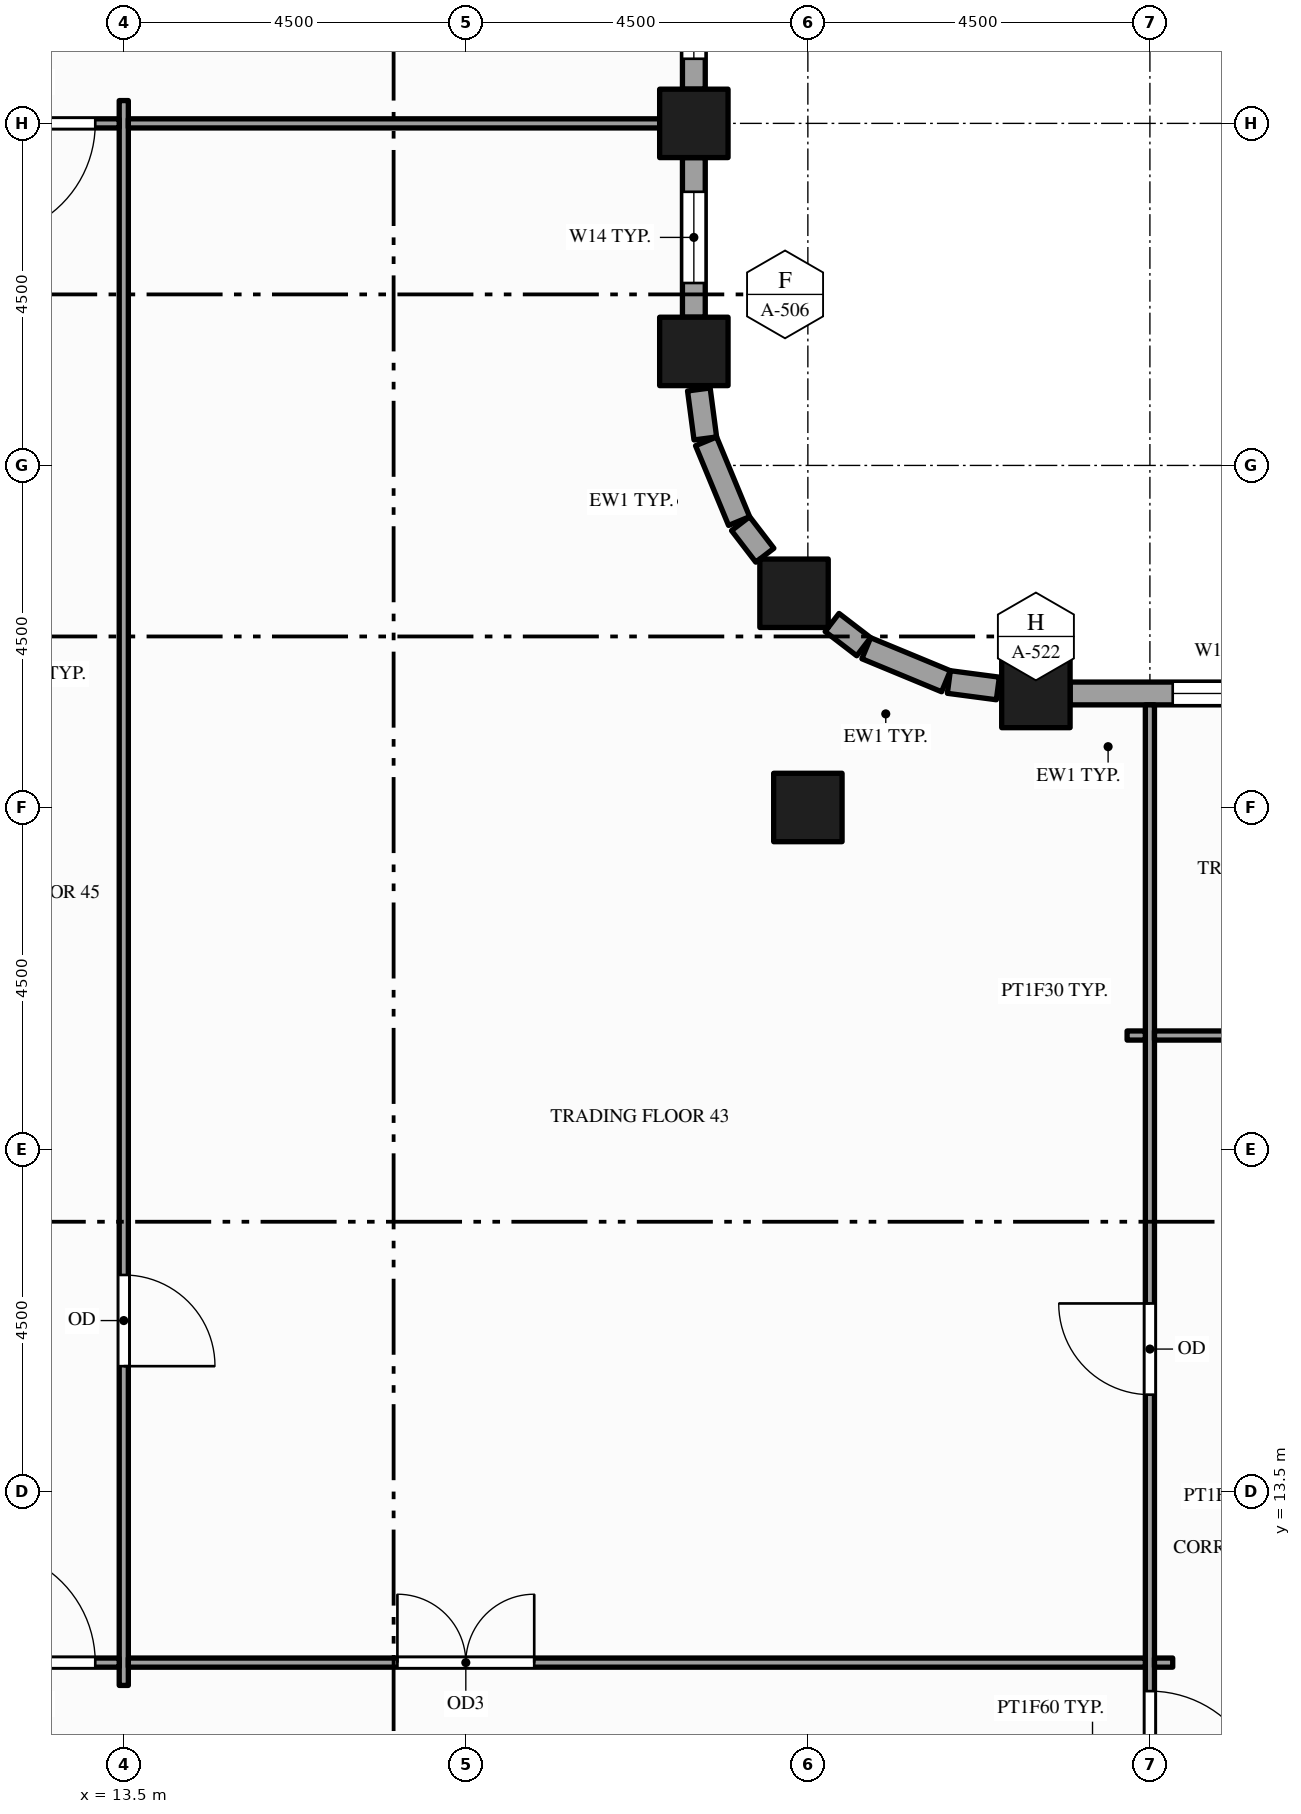
"""IFC4 building model, lengths in metres.
Left out: names, types, materials, properties, quantities, classifications, styles, units other than length and angle.
Written with IfcOpenShell. Run it as: python <this file> out.ifc"""

import sys

from ifc_helpers import new_model, si_unit, direction, frame, frame_2d, origin, origin_2d, place, context, subcontext, project, spatial, rectangle, hollow_rectangle, extrude, element, fill, save


model = new_model("IFC4")
c1 = context("Model", 3, precision=1e-05, world=origin(), true_north=direction((0.0, 1.0)))
c2 = subcontext(c1, "Body", "Model", "MODEL_VIEW")
j1 = project(units=[si_unit("LENGTHUNIT", "METRE"), si_unit("PLANEANGLEUNIT", "RADIAN")], contexts=[c1])
p1 = place(None, origin())
s1 = spatial("IfcSite", under=j1, at=p1, CompositionType="ELEMENT")
p2 = place(p1, origin())
s2 = spatial("IfcBuilding", under=s1, at=p2, CompositionType="ELEMENT")
p3 = place(p2, frame((0.0, 0.0, 179.0)))
s3 = spatial("IfcBuildingStorey", under=s2, at=p3, CompositionType="ELEMENT", Elevation=179.0)
for number, where, z_axis, x_axis in (
    (1, (21.0, 28.5, -0.15), (0.0, 0.0, 1.0), (1.0, 0.0, 0.0)),
    (2, (21.0, 31.5, -0.15), (0.0, 0.0, 1.0), (1.0, 0.0, 0.0)),
    (3, (22.318, 25.318, -0.15), (0.0, 0.0, 1.0), (1.0, 0.0, 0.0)),
    (4, (22.5, 22.5, -0.15), (0.0, 0.0, 1.0), (1.0, 0.0, 0.0)),
    (5, (25.5, 24.0, -0.15), (0.0, 0.0, 1.0), (1.0, 0.0, 0.0)),
):
    element("IfcColumn", number, at=place(p3, frame(where, z_axis=z_axis, x_axis=x_axis)), inside=s3, PredefinedType="COLUMN", context=c2, shape_type="SweptSolid", body=[
        extrude(hollow_rectangle(XDim=0.9, YDim=0.9, WallThickness=0.045, at=origin_2d()), origin(), (0.0, 0.0, 1.0), 4.0),
    ])
p4 = place(p3, frame((31.05, 24.0, 0.0), z_axis=(0.0, 0.0, 1.0), x_axis=(-1.0, 0.0, 0.0)))
e6 = element("IfcWall", 6, at=p4, inside=s3, PredefinedType="STANDARD", context=c2, shape_type="SweptSolid", body=[
    extrude(rectangle(XDim=5.1, YDim=0.3, at=frame_2d((2.55, 0.0))), origin(), (0.0, 0.0, 1.0), 2.87),
])
p5 = place(p4, frame((0.4, 0.0, 0.9)))
e7 = element("IfcOpeningElement", 7, at=p5, cuts=e6, PredefinedType="OPENING", context=c2, shape_type="SweptSolid", body=[
    extrude(rectangle(XDim=1.1, YDim=1.75, at=frame_2d((0.55, 0.875))), frame((0.0, 0.16, 0.0), z_axis=(0.0, -1.0, 0.0), x_axis=(1.0, 0.0, 0.0)), (0.0, 0.0, 1.0), 0.32),
])
p6 = place(p4, frame((2.1, 0.0, 0.9)))
e8 = element("IfcOpeningElement", 8, at=p6, cuts=e6, PredefinedType="OPENING", context=c2, shape_type="SweptSolid", body=[
    extrude(rectangle(XDim=1.65, YDim=1.75, at=frame_2d((0.825, 0.875))), frame((0.0, 0.16, 0.0), z_axis=(0.0, -1.0, 0.0), x_axis=(1.0, 0.0, 0.0)), (0.0, 0.0, 1.0), 0.32),
])
p7 = place(p3, frame((25.0, 24.066, 0.0), z_axis=(0.0, 0.0, 1.0), x_axis=(-0.991423590996, 0.130687655177, 0.0)))
e9 = element("IfcWall", 9, at=p7, inside=s3, PredefinedType="STANDARD", context=c2, shape_type="SweptSolid", body=[
    extrude(rectangle(XDim=0.65, YDim=0.3, at=frame_2d((0.325, 0.0))), origin(), (0.0, 0.0, 1.0), 2.87),
])
p8 = place(p3, frame((24.317, 24.161, 0.0), z_axis=(0.0, 0.0, 1.0), x_axis=(-0.923914616768, 0.382598720491, 0.0)))
e10 = element("IfcWall", 10, at=p8, inside=s3, PredefinedType="STANDARD", context=c2, shape_type="SweptSolid", body=[
    extrude(rectangle(XDim=1.135, YDim=0.3, at=frame_2d((0.568, 0.0))), origin(), (0.0, 0.0, 1.0), 3.149),
])
for number, where, z_axis, x_axis in (
    (11, (23.234, 24.615, 0.0), (0.0, 0.0, 1.0), (-0.794, 0.609, 0.0)),
    (12, (21.934, 25.819, 0.0), (0.0, 0.0, 1.0), (-0.609, 0.794, 0.0)),
):
    element("IfcWall", number, at=place(p3, frame(where, z_axis=z_axis, x_axis=x_axis)), inside=s3, PredefinedType="STANDARD", context=c2, shape_type="SweptSolid", body=[
        extrude(rectangle(XDim=0.524, YDim=0.3, at=frame_2d((0.262, 0.0))), origin(), (0.0, 0.0, 1.0), 3.149),
    ])
p9 = place(p3, frame((21.595, 26.268, 0.0), z_axis=(0.0, 0.0, 1.0), x_axis=(-0.382598720491, 0.923914616768, 0.0)))
e13 = element("IfcWall", 13, at=p9, inside=s3, PredefinedType="STANDARD", context=c2, shape_type="SweptSolid", body=[
    extrude(rectangle(XDim=1.135, YDim=0.3, at=frame_2d((0.568, 0.0))), origin(), (0.0, 0.0, 1.0), 3.149),
])
p10 = place(p3, frame((21.151, 27.355, 0.0), z_axis=(0.0, 0.0, 1.0), x_axis=(-0.130687655177, 0.991423590996, 0.0)))
e14 = element("IfcWall", 14, at=p10, inside=s3, PredefinedType="STANDARD", context=c2, shape_type="SweptSolid", body=[
    extrude(rectangle(XDim=0.65, YDim=0.3, at=frame_2d((0.325, 0.0))), origin(), (0.0, 0.0, 1.0), 3.149),
])
p11 = place(p3, frame((21.0, 28.95, 0.0), z_axis=(0.0, 0.0, 1.0), x_axis=(0.0, 1.0, 0.0)))
e15 = element("IfcWall", 15, at=p11, inside=s3, PredefinedType="STANDARD", context=c2, shape_type="SweptSolid", body=[
    extrude(rectangle(XDim=2.1, YDim=0.3, at=frame_2d((1.05, 0.0))), origin(), (0.0, 0.0, 1.0), 3.149),
])
p12 = place(p11, frame((0.45, 0.0, 0.9)))
e16 = element("IfcOpeningElement", 16, at=p12, cuts=e15, PredefinedType="OPENING", context=c2, shape_type="SweptSolid", body=[
    extrude(rectangle(XDim=1.2, YDim=2.0, at=frame_2d((0.6, 1.0))), frame((0.0, 0.16, 0.0), z_axis=(0.0, -1.0, 0.0), x_axis=(1.0, 0.0, 0.0)), (0.0, 0.0, 1.0), 0.32),
])
p13 = place(p3, frame((21.0, 31.95, 0.0), z_axis=(0.0, 0.0, 1.0), x_axis=(0.0, 1.0, 0.0)))
e17 = element("IfcWall", 17, at=p13, inside=s3, PredefinedType="STANDARD", context=c2, shape_type="SweptSolid", body=[
    extrude(rectangle(XDim=4.05, YDim=0.3, at=frame_2d((2.025, 0.0))), origin(), (0.0, 0.0, 1.0), 3.149),
])
p14 = place(p13, frame((0.4, 0.0, 0.9)))
e18 = element("IfcOpeningElement", 18, at=p14, cuts=e17, PredefinedType="OPENING", context=c2, shape_type="SweptSolid", body=[
    extrude(rectangle(XDim=1.1, YDim=2.0, at=frame_2d((0.55, 1.0))), frame((0.0, 0.16, 0.0), z_axis=(0.0, -1.0, 0.0), x_axis=(1.0, 0.0, 0.0)), (0.0, 0.0, 1.0), 0.32),
])
p15 = place(p13, frame((2.1, 0.0, 0.9)))
e19 = element("IfcOpeningElement", 19, at=p15, cuts=e17, PredefinedType="OPENING", context=c2, shape_type="SweptSolid", body=[
    extrude(rectangle(XDim=1.55, YDim=2.0, at=frame_2d((0.775, 1.0))), frame((0.0, 0.16, 0.0), z_axis=(0.0, -1.0, 0.0), x_axis=(1.0, 0.0, 0.0)), (0.0, 0.0, 1.0), 0.32),
])
p16 = place(p3, frame((13.5, 10.95, 0.0), z_axis=(0.0, 0.0, 1.0), x_axis=(0.0, 1.0, 0.0)))
e20 = element("IfcWall", 20, at=p16, inside=s3, PredefinedType="PARTITIONING", context=c2, shape_type="SweptSolid", body=[
    extrude(rectangle(XDim=20.85, YDim=0.12, at=frame_2d((10.425, 0.0))), origin(), (0.0, 0.0, 1.0), 2.6),
])
p17 = place(p16, frame((4.2, 0.0, 0.0)))
e21 = element("IfcOpeningElement", 21, at=p17, cuts=e20, PredefinedType="OPENING", context=c2, shape_type="SweptSolid", body=[
    extrude(rectangle(XDim=1.2, YDim=2.1, at=frame_2d((0.6, 1.05))), frame((0.0, 0.07, 0.0), z_axis=(0.0, -1.0, 0.0), x_axis=(1.0, 0.0, 0.0)), (0.0, 0.0, 1.0), 0.14),
])
p18 = place(p3, frame((27.0, 1.65, 0.0), z_axis=(0.0, 0.0, 1.0), x_axis=(0.0, 1.0, 0.0)))
e22 = element("IfcWall", 22, at=p18, inside=s3, PredefinedType="PARTITIONING", context=c2, shape_type="SweptSolid", body=[
    extrude(rectangle(XDim=22.2, YDim=0.12, at=frame_2d((11.1, 0.0))), origin(), (0.0, 0.0, 1.0), 2.87),
])
p19 = place(p18, frame((7.725, 0.0, 0.0)))
e23 = element("IfcOpeningElement", 23, at=p19, cuts=e22, PredefinedType="OPENING", context=c2, shape_type="SweptSolid", body=[
    extrude(rectangle(XDim=1.5, YDim=2.1, at=frame_2d((0.75, 1.05))), frame((0.0, 0.07, 0.0), z_axis=(0.0, -1.0, 0.0), x_axis=(1.0, 0.0, 0.0)), (0.0, 0.0, 1.0), 0.14),
])
p20 = place(p18, frame((13.125, 0.0, 0.0)))
e24 = element("IfcOpeningElement", 24, at=p20, cuts=e22, PredefinedType="OPENING", context=c2, shape_type="SweptSolid", body=[
    extrude(rectangle(XDim=1.2, YDim=2.1, at=frame_2d((0.6, 1.05))), frame((0.0, 0.07, 0.0), z_axis=(0.0, -1.0, 0.0), x_axis=(1.0, 0.0, 0.0)), (0.0, 0.0, 1.0), 0.14),
])
p21 = place(p3, frame((11.31, 11.25, 0.0), z_axis=(0.0, 0.0, 1.0), x_axis=(1.0, 0.0, 0.0)))
e25 = element("IfcWall", 25, at=p21, inside=s3, PredefinedType="PARTITIONING", context=c2, shape_type="SweptSolid", body=[
    extrude(rectangle(XDim=2.13, YDim=0.12, at=frame_2d((1.065, 0.0))), origin(), (0.0, 0.0, 1.0), 2.87),
])
p22 = place(p21, frame((0.315, 0.0, 0.0)))
e26 = element("IfcOpeningElement", 26, at=p22, cuts=e25, PredefinedType="OPENING", context=c2, shape_type="SweptSolid", body=[
    extrude(rectangle(XDim=1.5, YDim=2.1, at=frame_2d((0.75, 1.05))), frame((0.0, 0.07, 0.0), z_axis=(0.0, -1.0, 0.0), x_axis=(1.0, 0.0, 0.0)), (0.0, 0.0, 1.0), 0.14),
])
p23 = place(p3, frame((13.56, 11.25, 0.0), z_axis=(0.0, 0.0, 1.0), x_axis=(1.0, 0.0, 0.0)))
e27 = element("IfcWall", 27, at=p23, inside=s3, PredefinedType="PARTITIONING", context=c2, shape_type="SweptSolid", body=[
    extrude(rectangle(XDim=13.38, YDim=0.12, at=frame_2d((6.69, 0.0))), origin(), (0.0, 0.0, 1.0), 2.87),
])
p24 = place(p23, frame((3.54, 0.0, 0.0)))
e28 = element("IfcOpeningElement", 28, at=p24, cuts=e27, PredefinedType="OPENING", context=c2, shape_type="SweptSolid", body=[
    extrude(rectangle(XDim=1.8, YDim=2.1, at=frame_2d((0.9, 1.05))), frame((0.0, 0.07, 0.0), z_axis=(0.0, -1.0, 0.0), x_axis=(1.0, 0.0, 0.0)), (0.0, 0.0, 1.0), 0.14),
])
for number, where, z_axis, x_axis in (
    (29, (27.06, 11.25, 0.0), (0.0, 0.0, 1.0), (1.0, 0.0, 0.0)),
    (30, (26.7, 19.5, 0.0), (0.0, 0.0, 1.0), (1.0, 0.0, 0.0)),
):
    element("IfcWall", number, at=place(p3, frame(where, z_axis=z_axis, x_axis=x_axis)), inside=s3, PredefinedType="PARTITIONING", context=c2, shape_type="SweptSolid", body=[
        extrude(rectangle(XDim=0.24, YDim=0.12, at=frame_2d((0.12, 0.0))), origin(), (0.0, 0.0, 1.0), 2.87),
    ])
p25 = place(p3, frame((27.06, 19.5, 0.0), z_axis=(0.0, 0.0, 1.0), x_axis=(1.0, 0.0, 0.0)))
e31 = element("IfcWall", 31, at=p25, inside=s3, PredefinedType="PARTITIONING", context=c2, shape_type="SweptSolid", body=[
    extrude(rectangle(XDim=2.13, YDim=0.12, at=frame_2d((1.065, 0.0))), origin(), (0.0, 0.0, 1.0), 2.87),
])
p26 = place(p3, frame((11.31, 31.5, 0.0), z_axis=(0.0, 0.0, 1.0), x_axis=(1.0, 0.0, 0.0)))
e32 = element("IfcWall", 32, at=p26, inside=s3, PredefinedType="PARTITIONING", context=c2, shape_type="SweptSolid", body=[
    extrude(rectangle(XDim=2.13, YDim=0.12, at=frame_2d((1.065, 0.0))), origin(), (0.0, 0.0, 1.0), 2.87),
])
p27 = place(p26, frame((0.315, 0.0, 0.0)))
e33 = element("IfcOpeningElement", 33, at=p27, cuts=e32, PredefinedType="OPENING", context=c2, shape_type="SweptSolid", body=[
    extrude(rectangle(XDim=1.5, YDim=2.1, at=frame_2d((0.75, 1.05))), frame((0.0, 0.07, 0.0), z_axis=(0.0, -1.0, 0.0), x_axis=(1.0, 0.0, 0.0)), (0.0, 0.0, 1.0), 0.14),
])
p28 = place(p3, frame((13.56, 31.5, 0.0), z_axis=(0.0, 0.0, 1.0), x_axis=(1.0, 0.0, 0.0)))
e34 = element("IfcWall", 34, at=p28, inside=s3, PredefinedType="PARTITIONING", context=c2, shape_type="SweptSolid", body=[
    extrude(rectangle(XDim=7.29, YDim=0.12, at=frame_2d((3.645, 0.0))), origin(), (0.0, 0.0, 1.0), 2.87),
])
p29 = place(p6, origin())
e35 = element("IfcWindow", 35, at=p29, inside=s3, PartitioningType="SINGLE_PANEL", PredefinedType="WINDOW", context=c2, shape_type="SweptSolid", body=[
    extrude(rectangle(XDim=1.65, YDim=1.75, at=frame_2d((0.825, 0.875))), frame((0.0, 0.03, 0.0), z_axis=(0.0, -1.0, 0.0), x_axis=(1.0, 0.0, 0.0)), (0.0, 0.0, 1.0), 0.06),
])
fill(e8, e35)
p30 = place(p12, origin())
e36 = element("IfcWindow", 36, at=p30, inside=s3, PartitioningType="SINGLE_PANEL", PredefinedType="WINDOW", context=c2, shape_type="SweptSolid", body=[
    extrude(rectangle(XDim=1.2, YDim=2.0, at=frame_2d((0.6, 1.0))), frame((0.0, 0.03, 0.0), z_axis=(0.0, -1.0, 0.0), x_axis=(1.0, 0.0, 0.0)), (0.0, 0.0, 1.0), 0.06),
])
fill(e16, e36)
p31 = place(p14, origin())
e37 = element("IfcWindow", 37, at=p31, inside=s3, PartitioningType="SINGLE_PANEL", PredefinedType="WINDOW", context=c2, shape_type="SweptSolid", body=[
    extrude(rectangle(XDim=1.1, YDim=2.0, at=frame_2d((0.55, 1.0))), frame((0.0, 0.03, 0.0), z_axis=(0.0, -1.0, 0.0), x_axis=(1.0, 0.0, 0.0)), (0.0, 0.0, 1.0), 0.06),
])
fill(e18, e37)
p32 = place(p19, origin())
e38 = element("IfcDoor", 38, at=p32, inside=s3, OperationType="SINGLE_SWING_LEFT", PredefinedType="DOOR", context=c2, shape_type="SweptSolid", body=[
    extrude(rectangle(XDim=1.5, YDim=2.1, at=frame_2d((0.75, 1.05))), frame((0.0, 0.025, 0.0), z_axis=(0.0, -1.0, 0.0), x_axis=(1.0, 0.0, 0.0)), (0.0, 0.0, 1.0), 0.05),
])
fill(e23, e38)
p33 = place(p24, origin())
e39 = element("IfcDoor", 39, at=p33, inside=s3, OperationType="DOUBLE_DOOR_SINGLE_SWING", PredefinedType="DOOR", context=c2, shape_type="SweptSolid", body=[
    extrude(rectangle(XDim=1.8, YDim=2.1, at=frame_2d((0.9, 1.05))), frame((0.0, 0.025, 0.0), z_axis=(0.0, -1.0, 0.0), x_axis=(1.0, 0.0, 0.0)), (0.0, 0.0, 1.0), 0.05),
])
fill(e28, e39)
p34 = place(p22, origin())
e40 = element("IfcDoor", 40, at=p34, inside=s3, OperationType="SINGLE_SWING_LEFT", PredefinedType="DOOR", context=c2, shape_type="SweptSolid", body=[
    extrude(rectangle(XDim=1.5, YDim=2.1, at=frame_2d((0.75, 1.05))), frame((0.0, 0.025, 0.0), z_axis=(0.0, -1.0, 0.0), x_axis=(1.0, 0.0, 0.0)), (0.0, 0.0, 1.0), 0.05),
])
fill(e26, e40)
p35 = place(p27, origin())
e41 = element("IfcDoor", 41, at=p35, inside=s3, OperationType="SINGLE_SWING_LEFT", PredefinedType="DOOR", context=c2, shape_type="SweptSolid", body=[
    extrude(rectangle(XDim=1.5, YDim=2.1, at=frame_2d((0.75, 1.05))), frame((0.0, 0.025, 0.0), z_axis=(0.0, -1.0, 0.0), x_axis=(1.0, 0.0, 0.0)), (0.0, 0.0, 1.0), 0.05),
])
fill(e33, e41)
p36 = place(p17, origin())
e42 = element("IfcDoor", 42, at=p36, inside=s3, OperationType="SINGLE_SWING_LEFT", PredefinedType="DOOR", context=c2, shape_type="SweptSolid", body=[
    extrude(rectangle(XDim=1.2, YDim=2.1, at=frame_2d((0.6, 1.05))), frame((0.0, 0.025, 0.0), z_axis=(0.0, -1.0, 0.0), x_axis=(1.0, 0.0, 0.0)), (0.0, 0.0, 1.0), 0.05),
])
fill(e21, e42)
p37 = place(p20, origin())
e43 = element("IfcDoor", 43, at=p37, inside=s3, OperationType="SINGLE_SWING_RIGHT", PredefinedType="DOOR", context=c2, shape_type="SweptSolid", body=[
    extrude(rectangle(XDim=1.2, YDim=2.1, at=frame_2d((0.6, 1.05))), frame((0.0, 0.025, 0.0), z_axis=(0.0, -1.0, 0.0), x_axis=(1.0, 0.0, 0.0)), (0.0, 0.0, 1.0), 0.05),
])
fill(e24, e43)
save(model, sys.argv[1])
